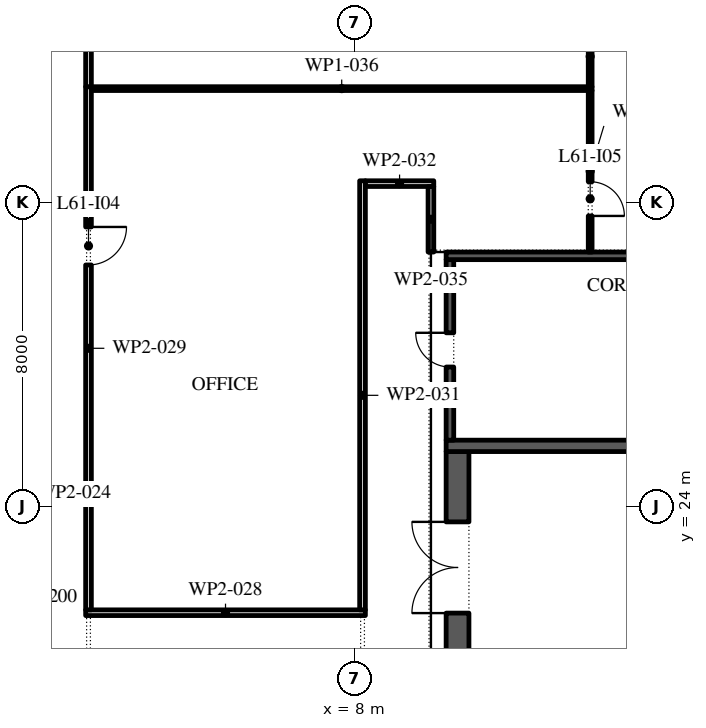
"""IFC4 building model, lengths in metres.
Left out: names, types, materials, properties, quantities, classifications, styles, units other than length and angle.
Written with IfcOpenShell. Run it as: python <this file> out.ifc"""

import sys

from ifc_helpers import new_model, si_unit, direction, frame, frame_2d, origin, place, context, subcontext, project, spatial, rectangle, extrude, element, fill, save


model = new_model("IFC4")
c1 = context("Model", 3, precision=1e-05, world=origin(), true_north=direction((0.0, 1.0)))
c2 = subcontext(c1, "Body", "Model", "MODEL_VIEW")
j1 = project(units=[si_unit("LENGTHUNIT", "METRE"), si_unit("PLANEANGLEUNIT", "RADIAN")], contexts=[c1])
p1 = place(None, origin())
s1 = spatial("IfcSite", under=j1, at=p1, CompositionType="ELEMENT")
p2 = place(p1, origin())
s2 = spatial("IfcBuilding", under=s1, at=p2, CompositionType="ELEMENT")
p3 = place(p2, frame((0.0, 0.0, 280.8)))
s3 = spatial("IfcBuildingStorey", under=s2, at=p3, CompositionType="ELEMENT", Elevation=280.8)
p4 = place(p3, frame((10.7, -2.45, 0.0), z_axis=(0.0, 0.0, 1.0), x_axis=(0.0, 1.0, 0.0)))
e1 = element("IfcWall", 1, at=p4, inside=s3, PredefinedType="SHEAR", context=c2, shape_type="SweptSolid", body=[
    extrude(rectangle(XDim=27.9, YDim=0.6, at=frame_2d((13.95, 0.0))), origin(), (0.0, 0.0, 1.0), 4.0),
])
p5 = place(p4, frame((23.65, 0.0, 0.0)))
e2 = element("IfcOpeningElement", 2, at=p5, cuts=e1, PredefinedType="OPENING", context=c2, shape_type="SweptSolid", body=[
    extrude(rectangle(XDim=2.4, YDim=2.1, at=frame_2d((1.2, 1.05))), frame((0.0, 0.31, 0.0), z_axis=(0.0, -1.0, 0.0), x_axis=(1.0, 0.0, 0.0)), (0.0, 0.0, 1.0), 0.62),
])
p6 = place(p4, frame((1.087, 0.0, 0.0)))
e3 = element("IfcOpeningElement", 3, at=p6, cuts=e1, PredefinedType="OPENING", context=c2, shape_type="SweptSolid", body=[
    extrude(rectangle(XDim=0.9, YDim=2.1, at=frame_2d((0.45, 1.05))), frame((0.0, 0.31, 0.0), z_axis=(0.0, -1.0, 0.0), x_axis=(1.0, 0.0, 0.0)), (0.0, 0.0, 1.0), 0.62),
])
p7 = place(p4, frame((4.262, 0.0, 0.0)))
e4 = element("IfcOpeningElement", 4, at=p7, cuts=e1, PredefinedType="OPENING", context=c2, shape_type="SweptSolid", body=[
    extrude(rectangle(XDim=1.0, YDim=2.1, at=frame_2d((0.5, 1.05))), frame((0.0, 0.31, 0.0), z_axis=(0.0, -1.0, 0.0), x_axis=(1.0, 0.0, 0.0)), (0.0, 0.0, 1.0), 0.62),
])
p8 = place(p3, frame((10.4, 25.6, 0.0), z_axis=(0.0, 0.0, 1.0), x_axis=(1.0, 0.0, 0.0)))
e5 = element("IfcWall", 5, at=p8, inside=s3, PredefinedType="SHEAR", context=c2, shape_type="SweptSolid", body=[
    extrude(rectangle(XDim=11.2, YDim=0.3, at=frame_2d((5.6, 0.0))), origin(), (0.0, 0.0, 1.0), 4.0),
])
p9 = place(p3, frame((10.5, 25.75, 0.0), z_axis=(0.0, 0.0, 1.0), x_axis=(0.0, 1.0, 0.0)))
e6 = element("IfcWall", 6, at=p9, inside=s3, PredefinedType="SHEAR", context=c2, shape_type="SweptSolid", body=[
    extrude(rectangle(XDim=4.75, YDim=0.2, at=frame_2d((2.375, 0.0))), origin(), (0.0, 0.0, 1.0), 4.0),
])
p10 = place(p9, frame((1.925, 0.0, 0.0)))
e7 = element("IfcOpeningElement", 7, at=p10, cuts=e6, PredefinedType="OPENING", context=c2, shape_type="SweptSolid", body=[
    extrude(rectangle(XDim=0.9, YDim=2.1, at=frame_2d((0.45, 1.05))), frame((0.0, 0.11, 0.0), z_axis=(0.0, -1.0, 0.0), x_axis=(1.0, 0.0, 0.0)), (0.0, 0.0, 1.0), 0.22),
])
p11 = place(p3, frame((10.4, 30.6, 0.0), z_axis=(0.0, 0.0, 1.0), x_axis=(1.0, 0.0, 0.0)))
e8 = element("IfcWall", 8, at=p11, inside=s3, PredefinedType="SHEAR", context=c2, shape_type="SweptSolid", body=[
    extrude(rectangle(XDim=11.2, YDim=0.2, at=frame_2d((5.6, 0.0))), origin(), (0.0, 0.0, 1.0), 4.0),
])
p12 = place(p3, frame((0.915, 21.21, 0.0), z_axis=(0.0, 0.0, 1.0), x_axis=(1.0, 0.0, 0.0)))
e9 = element("IfcWall", 9, at=p12, inside=s3, PredefinedType="PARTITIONING", context=c2, shape_type="SweptSolid", body=[
    extrude(rectangle(XDim=7.36, YDim=0.15, at=frame_2d((3.68, 0.0))), origin(), (0.0, 0.0, 1.0), 4.0),
])
p13 = place(p3, frame((0.99, 35.05, 0.0), z_axis=(0.0, 0.0, 1.0), x_axis=(0.0, -1.0, 0.0)))
e10 = element("IfcWall", 10, at=p13, inside=s3, PredefinedType="PARTITIONING", context=c2, shape_type="SweptSolid", body=[
    extrude(rectangle(XDim=13.765, YDim=0.15, at=frame_2d((6.883, 0.0))), origin(), (0.0, 0.0, 1.0), 4.0),
])
p14 = place(p13, frame((3.69, 0.0, 0.0)))
e11 = element("IfcOpeningElement", 11, at=p14, cuts=e10, PredefinedType="OPENING", context=c2, shape_type="SweptSolid", body=[
    extrude(rectangle(XDim=1.0, YDim=2.1, at=frame_2d((0.5, 1.05))), frame((0.0, 0.085, 0.0), z_axis=(0.0, -1.0, 0.0), x_axis=(1.0, 0.0, 0.0)), (0.0, 0.0, 1.0), 0.17),
])
p15 = place(p3, frame((0.99, 47.296, 0.0), z_axis=(0.0, 0.0, 1.0), x_axis=(0.0, -1.0, 0.0)))
e12 = element("IfcWall", 12, at=p15, inside=s3, PredefinedType="PARTITIONING", context=c2, shape_type="SweptSolid", body=[
    extrude(rectangle(XDim=12.246, YDim=0.15, at=frame_2d((6.123, 0.0))), origin(), (0.0, 0.0, 1.0), 4.0),
])
p16 = place(p15, frame((3.146, 0.0, 0.0)))
e13 = element("IfcOpeningElement", 13, at=p16, cuts=e12, PredefinedType="OPENING", context=c2, shape_type="SweptSolid", body=[
    extrude(rectangle(XDim=1.0, YDim=2.1, at=frame_2d((0.5, 1.05))), frame((0.0, 0.085, 0.0), z_axis=(0.0, -1.0, 0.0), x_axis=(1.0, 0.0, 0.0)), (0.0, 0.0, 1.0), 0.17),
])
p17 = place(p3, frame((8.2, 21.285, 0.0), z_axis=(0.0, 0.0, 1.0), x_axis=(0.0, 1.0, 0.0)))
e14 = element("IfcWall", 14, at=p17, inside=s3, PredefinedType="PARTITIONING", context=c2, shape_type="SweptSolid", body=[
    extrude(rectangle(XDim=11.29, YDim=0.15, at=frame_2d((5.645, 0.0))), origin(), (0.0, 0.0, 1.0), 4.0),
])
p18 = place(p3, frame((8.275, 32.5, 0.0), z_axis=(0.0, 0.0, 1.0), x_axis=(1.0, 0.0, 0.0)))
e15 = element("IfcWall", 15, at=p18, inside=s3, PredefinedType="PARTITIONING", context=c2, shape_type="SweptSolid", body=[
    extrude(rectangle(XDim=1.8, YDim=0.15, at=frame_2d((0.9, 0.0))), origin(), (0.0, 0.0, 1.0), 4.0),
])
p19 = place(p3, frame((10.0, 32.425, 0.0), z_axis=(0.0, 0.0, 1.0), x_axis=(0.0, -1.0, 0.0)))
e16 = element("IfcWall", 16, at=p19, inside=s3, PredefinedType="PARTITIONING", context=c2, shape_type="SweptSolid", body=[
    extrude(rectangle(XDim=1.725, YDim=0.15, at=frame_2d((0.863, 0.0))), origin(), (0.0, 0.0, 1.0), 4.0),
])
p20 = place(p3, frame((14.24, 35.0, 0.0), z_axis=(0.0, 0.0, 1.0), x_axis=(-1.0, 0.0, 0.0)))
e17 = element("IfcWall", 17, at=p20, inside=s3, PredefinedType="PARTITIONING", context=c2, shape_type="SweptSolid", body=[
    extrude(rectangle(XDim=13.175, YDim=0.1, at=frame_2d((6.587, 0.0))), origin(), (0.0, 0.0, 1.0), 4.0),
])
p21 = place(p3, frame((14.19, 34.95, 0.0), z_axis=(0.0, 0.0, 1.0), x_axis=(0.0, -1.0, 0.0)))
e18 = element("IfcWall", 18, at=p21, inside=s3, PredefinedType="PARTITIONING", context=c2, shape_type="SweptSolid", body=[
    extrude(rectangle(XDim=4.25, YDim=0.1, at=frame_2d((2.125, 0.0))), origin(), (0.0, 0.0, 1.0), 4.0),
])
p22 = place(p21, frame((2.4, 0.0, 0.0)))
e19 = element("IfcOpeningElement", 19, at=p22, cuts=e18, PredefinedType="OPENING", context=c2, shape_type="SweptSolid", body=[
    extrude(rectangle(XDim=0.9, YDim=2.1, at=frame_2d((0.45, 1.05))), frame((0.0, 0.06, 0.0), z_axis=(0.0, -1.0, 0.0), x_axis=(1.0, 0.0, 0.0)), (0.0, 0.0, 1.0), 0.12),
])
p23 = place(p3, frame((14.19, 36.64, 0.0), z_axis=(0.0, 0.0, 1.0), x_axis=(0.0, -1.0, 0.0)))
e20 = element("IfcWall", 20, at=p23, inside=s3, PredefinedType="PARTITIONING", context=c2, shape_type="SweptSolid", body=[
    extrude(rectangle(XDim=1.59, YDim=0.1, at=frame_2d((0.795, 0.0))), origin(), (0.0, 0.0, 1.0), 4.0),
])
p24 = place(p5, origin())
e21 = element("IfcDoor", 21, at=p24, inside=s3, OperationType="DOUBLE_DOOR_SINGLE_SWING", PredefinedType="DOOR", context=c2, shape_type="SweptSolid", body=[
    extrude(rectangle(XDim=2.4, YDim=2.1, at=frame_2d((1.2, 1.05))), frame((0.0, 0.025, 0.0), z_axis=(0.0, -1.0, 0.0), x_axis=(1.0, 0.0, 0.0)), (0.0, 0.0, 1.0), 0.05),
])
fill(e2, e21)
p25 = place(p10, origin())
e22 = element("IfcDoor", 22, at=p25, inside=s3, OperationType="SINGLE_SWING_LEFT", PredefinedType="DOOR", context=c2, shape_type="SweptSolid", body=[
    extrude(rectangle(XDim=0.9, YDim=2.1, at=frame_2d((0.45, 1.05))), frame((0.0, -0.05, 0.0), z_axis=(0.0, -1.0, 0.0), x_axis=(1.0, 0.0, 0.0)), (0.0, 0.0, 1.0), 0.05),
])
fill(e7, e22)
p26 = place(p14, origin())
e23 = element("IfcDoor", 23, at=p26, inside=s3, OperationType="SINGLE_SWING_RIGHT", PredefinedType="DOOR", context=c2, shape_type="SweptSolid", body=[
    extrude(rectangle(XDim=1.0, YDim=2.1, at=frame_2d((0.5, 1.05))), frame((0.0, 0.025, 0.0), z_axis=(0.0, -1.0, 0.0), x_axis=(1.0, 0.0, 0.0)), (0.0, 0.0, 1.0), 0.05),
])
fill(e11, e23)
p27 = place(p22, origin())
e24 = element("IfcDoor", 24, at=p27, inside=s3, OperationType="SINGLE_SWING_LEFT", PredefinedType="DOOR", context=c2, shape_type="SweptSolid", body=[
    extrude(rectangle(XDim=0.9, YDim=2.1, at=frame_2d((0.45, 1.05))), frame((0.0, 0.025, 0.0), z_axis=(0.0, -1.0, 0.0), x_axis=(1.0, 0.0, 0.0)), (0.0, 0.0, 1.0), 0.05),
])
fill(e19, e24)
save(model, sys.argv[1])
